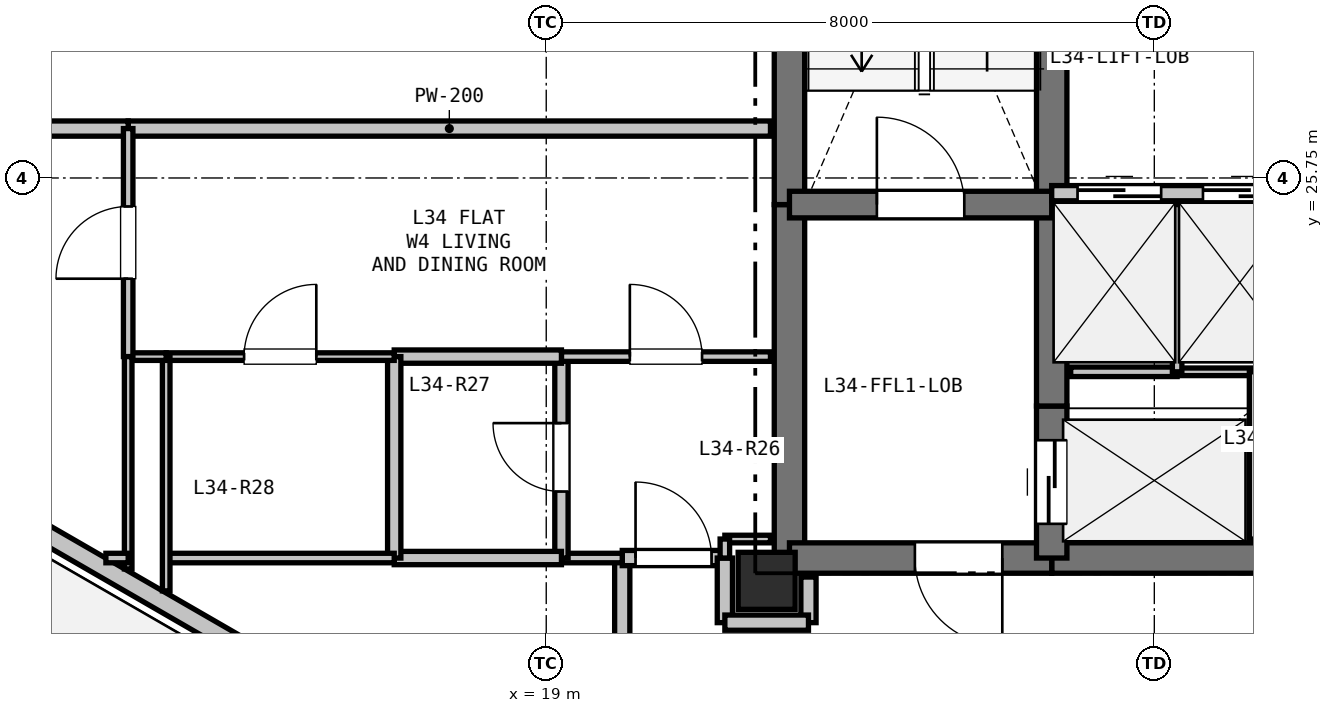
"""IFC4 building model, lengths in metres.
Left out: names, types, materials, properties, quantities, classifications, styles, units other than length and angle.
Written with IfcOpenShell. Run it as: python <this file> out.ifc"""

import sys

from ifc_helpers import new_model, si_unit, direction, frame, frame_2d, origin, origin_2d, place, context, subcontext, project, spatial, rectangle, extrude, element, fill, save


model = new_model("IFC4")
c1 = context("Model", 3, precision=1e-05, world=origin(), true_north=direction((0.0, 1.0)))
c2 = subcontext(c1, "Body", "Model", "MODEL_VIEW")
j1 = project(units=[si_unit("LENGTHUNIT", "METRE"), si_unit("PLANEANGLEUNIT", "RADIAN")], contexts=[c1])
p1 = place(None, origin())
s1 = spatial("IfcSite", under=j1, at=p1, CompositionType="ELEMENT")
p2 = place(p1, origin())
s2 = spatial("IfcBuilding", under=s1, at=p2, CompositionType="ELEMENT")
p3 = place(p2, frame((0.0, 0.0, 124.5)))
s3 = spatial("IfcBuildingStorey", under=s2, at=p3, CompositionType="ELEMENT", Elevation=124.5)
p4 = place(p3, frame((21.9, 20.45, 0.0), z_axis=(0.0, 0.0, 1.0), x_axis=(1.0, 0.0, 0.0)))
e1 = element("IfcColumn", 1, at=p4, inside=s3, PredefinedType="COLUMN", context=c2, shape_type="SweptSolid", body=[
    extrude(rectangle(XDim=0.75, YDim=0.75, at=origin_2d()), origin(), (0.0, 0.0, 1.0), 3.3),
])
p5 = place(p3, frame((16.378, 18.773, 0.0), z_axis=(0.0, 0.0, 1.0), x_axis=(-0.866027848477, 0.499995765644, 0.0)))
e2 = element("IfcWall", 2, at=p5, inside=s3, PredefinedType="SOLIDWALL", context=c2, shape_type="SweptSolid", body=[
    extrude(rectangle(XDim=11.186, YDim=0.25, at=frame_2d((5.593, 0.0))), origin(), (0.0, 0.0, 1.0), 2.68),
])
p6 = place(p5, frame((6.757, 0.0, 0.9)))
e3 = element("IfcOpeningElement", 3, at=p6, cuts=e2, PredefinedType="OPENING", context=c2, shape_type="SweptSolid", body=[
    extrude(rectangle(XDim=1.2, YDim=1.4, at=frame_2d((0.6, 0.7))), frame((0.0, 0.135, 0.0), z_axis=(0.0, -1.0, 0.0), x_axis=(1.0, 0.0, 0.0)), (0.0, 0.0, 1.0), 0.27),
])
p7 = place(p3, frame((22.2, 20.75, 0.0), z_axis=(0.0, 0.0, 1.0), x_axis=(0.0, 1.0, 0.0)))
e4 = element("IfcWall", 4, at=p7, inside=s3, PredefinedType="SHEAR", context=c2, shape_type="SweptSolid", body=[
    extrude(rectangle(XDim=4.65, YDim=0.4, at=frame_2d((2.325, 0.0))), origin(), (0.0, 0.0, 1.0), 3.06),
])
p8 = place(p3, frame((22.2, 25.4, 0.0), z_axis=(0.0, 0.0, 1.0), x_axis=(0.0, 1.0, 0.0)))
e5 = element("IfcWall", 5, at=p8, inside=s3, PredefinedType="SHEAR", context=c2, shape_type="SweptSolid", body=[
    extrude(rectangle(XDim=7.35, YDim=0.4, at=frame_2d((3.675, 0.0))), origin(), (0.0, 0.0, 1.0), 3.06),
])
p9 = place(p3, frame((28.35, 20.75, 0.0), z_axis=(0.0, 0.0, 1.0), x_axis=(-1.0, 0.0, 0.0)))
e6 = element("IfcWall", 6, at=p9, inside=s3, PredefinedType="SHEAR", context=c2, shape_type="SweptSolid", body=[
    extrude(rectangle(XDim=2.7, YDim=0.4, at=frame_2d((1.35, 0.0))), origin(), (0.0, 0.0, 1.0), 3.06),
])
p10 = place(p3, frame((25.65, 20.75, 0.0), z_axis=(0.0, 0.0, 1.0), x_axis=(-1.0, 0.0, 0.0)))
e7 = element("IfcWall", 7, at=p10, inside=s3, PredefinedType="SHEAR", context=c2, shape_type="SweptSolid", body=[
    extrude(rectangle(XDim=3.45, YDim=0.4, at=frame_2d((1.725, 0.0))), origin(), (0.0, 0.0, 1.0), 3.06),
])
p11 = place(p10, frame((0.65, 0.0, 0.0)))
e8 = element("IfcOpeningElement", 8, at=p11, cuts=e7, PredefinedType="OPENING", context=c2, shape_type="SweptSolid", body=[
    extrude(rectangle(XDim=1.15, YDim=2.15, at=frame_2d((0.575, 1.075))), frame((0.0, 0.21, 0.0), z_axis=(0.0, -1.0, 0.0), x_axis=(1.0, 0.0, 0.0)), (0.0, 0.0, 1.0), 0.42),
])
p12 = place(p3, frame((25.65, 20.75, 0.0), z_axis=(0.0, 0.0, 1.0), x_axis=(0.0, 1.0, 0.0)))
e9 = element("IfcWall", 9, at=p12, inside=s3, PredefinedType="SHEAR", context=c2, shape_type="SweptSolid", body=[
    extrude(rectangle(XDim=2.0, YDim=0.4, at=frame_2d((1.0, 0.0))), origin(), (0.0, 0.0, 1.0), 3.06),
])
p13 = place(p12, frame((0.45, 0.0, 0.0)))
e10 = element("IfcOpeningElement", 10, at=p13, cuts=e9, PredefinedType="OPENING", context=c2, shape_type="SweptSolid", body=[
    extrude(rectangle(XDim=1.1, YDim=2.15, at=frame_2d((0.55, 1.075))), frame((0.0, 0.21, 0.0), z_axis=(0.0, -1.0, 0.0), x_axis=(1.0, 0.0, 0.0)), (0.0, 0.0, 1.0), 0.42),
])
p14 = place(p3, frame((25.65, 22.75, 0.0), z_axis=(0.0, 0.0, 1.0), x_axis=(0.0, 1.0, 0.0)))
e11 = element("IfcWall", 11, at=p14, inside=s3, PredefinedType="SHEAR", context=c2, shape_type="SweptSolid", body=[
    extrude(rectangle(XDim=2.8, YDim=0.4, at=frame_2d((1.4, 0.0))), origin(), (0.0, 0.0, 1.0), 3.06),
])
p15 = place(p3, frame((25.65, 25.55, 0.0), z_axis=(0.0, 0.0, 1.0), x_axis=(0.0, 1.0, 0.0)))
e12 = element("IfcWall", 12, at=p15, inside=s3, PredefinedType="SHEAR", context=c2, shape_type="SweptSolid", body=[
    extrude(rectangle(XDim=2.4, YDim=0.4, at=frame_2d((1.2, 0.0))), origin(), (0.0, 0.0, 1.0), 3.06),
])
p16 = place(p3, frame((22.2, 25.4, 0.0), z_axis=(0.0, 0.0, 1.0), x_axis=(1.0, 0.0, 0.0)))
e13 = element("IfcWall", 13, at=p16, inside=s3, PredefinedType="SHEAR", context=c2, shape_type="SweptSolid", body=[
    extrude(rectangle(XDim=3.45, YDim=0.35, at=frame_2d((1.725, 0.0))), origin(), (0.0, 0.0, 1.0), 3.06),
])
p17 = place(p16, frame((1.15, 0.0, 0.0)))
e14 = element("IfcOpeningElement", 14, at=p17, cuts=e13, PredefinedType="OPENING", context=c2, shape_type="SweptSolid", body=[
    extrude(rectangle(XDim=1.15, YDim=2.15, at=frame_2d((0.575, 1.075))), frame((0.0, 0.185, 0.0), z_axis=(0.0, -1.0, 0.0), x_axis=(1.0, 0.0, 0.0)), (0.0, 0.0, 1.0), 0.37),
])
p18 = place(p3, frame((25.65, 25.55, 0.0), z_axis=(0.0, 0.0, 1.0), x_axis=(1.0, 0.0, 0.0)))
e15 = element("IfcWall", 15, at=p18, inside=s3, PredefinedType="PARTITIONING", context=c2, shape_type="SweptSolid", body=[
    extrude(rectangle(XDim=4.95, YDim=0.2, at=frame_2d((2.475, 0.0))), origin(), (0.0, 0.0, 1.0), 3.06),
])
p19 = place(p18, frame((0.34, 0.0, 0.0)))
e16 = element("IfcOpeningElement", 16, at=p19, cuts=e15, PredefinedType="OPENING", context=c2, shape_type="SweptSolid", body=[
    extrude(rectangle(XDim=1.1, YDim=2.15, at=frame_2d((0.55, 1.075))), frame((0.0, 0.11, 0.0), z_axis=(0.0, -1.0, 0.0), x_axis=(1.0, 0.0, 0.0)), (0.0, 0.0, 1.0), 0.22),
])
p20 = place(p18, frame((1.99, 0.0, 0.0)))
e17 = element("IfcOpeningElement", 17, at=p20, cuts=e15, PredefinedType="OPENING", context=c2, shape_type="SweptSolid", body=[
    extrude(rectangle(XDim=1.1, YDim=2.15, at=frame_2d((0.55, 1.075))), frame((0.0, 0.11, 0.0), z_axis=(0.0, -1.0, 0.0), x_axis=(1.0, 0.0, 0.0)), (0.0, 0.0, 1.0), 0.22),
])
p21 = place(p18, frame((3.64, 0.0, 0.0)))
e18 = element("IfcOpeningElement", 18, at=p21, cuts=e15, PredefinedType="OPENING", context=c2, shape_type="SweptSolid", body=[
    extrude(rectangle(XDim=1.1, YDim=2.15, at=frame_2d((0.55, 1.075))), frame((0.0, 0.11, 0.0), z_axis=(0.0, -1.0, 0.0), x_axis=(1.0, 0.0, 0.0)), (0.0, 0.0, 1.0), 0.22),
])
p22 = place(p3, frame((25.9, 23.2, 0.0), z_axis=(0.0, 0.0, 1.0), x_axis=(1.0, 0.0, 0.0)))
e19 = element("IfcWall", 19, at=p22, inside=s3, PredefinedType="PARTITIONING", context=c2, shape_type="SweptSolid", body=[
    extrude(rectangle(XDim=1.4, YDim=0.125, at=frame_2d((0.7, 0.0))), origin(), (0.0, 0.0, 1.0), 3.06),
])
p23 = place(p3, frame((27.3, 23.2, 0.0), z_axis=(0.0, 0.0, 1.0), x_axis=(1.0, 0.0, 0.0)))
e20 = element("IfcWall", 20, at=p23, inside=s3, PredefinedType="PARTITIONING", context=c2, shape_type="SweptSolid", body=[
    extrude(rectangle(XDim=1.05, YDim=0.1, at=frame_2d((0.525, 0.0))), origin(), (0.0, 0.0, 1.0), 3.06),
])
p24 = place(p3, frame((28.35, 23.2, 0.0), z_axis=(0.0, 0.0, 1.0), x_axis=(0.0, -1.0, 0.0)))
e21 = element("IfcWall", 21, at=p24, inside=s3, PredefinedType="PARTITIONING", context=c2, shape_type="SweptSolid", body=[
    extrude(rectangle(XDim=2.2, YDim=0.2, at=frame_2d((1.1, 0.0))), origin(), (0.0, 0.0, 1.0), 3.06),
])
p25 = place(p3, frame((27.3, 25.4, 0.0), z_axis=(0.0, 0.0, 1.0), x_axis=(0.0, -1.0, 0.0)))
e22 = element("IfcWall", 22, at=p25, inside=s3, PredefinedType="PARTITIONING", context=c2, shape_type="SweptSolid", body=[
    extrude(rectangle(XDim=2.2, YDim=0.125, at=frame_2d((1.1, 0.0))), origin(), (0.0, 0.0, 1.0), 3.06),
])
p26 = place(p3, frame((22.45, 19.9, 0.0), z_axis=(0.0, 0.0, 1.0), x_axis=(0.0, 1.0, 0.0)))
e23 = element("IfcWall", 23, at=p26, inside=s3, PredefinedType="PARTITIONING", context=c2, shape_type="SweptSolid", body=[
    extrude(rectangle(XDim=0.6, YDim=0.2, at=frame_2d((0.3, 0.0))), origin(), (0.0, 0.0, 1.0), 2.433),
])
p27 = place(p3, frame((20.0, 18.15, 0.0), z_axis=(0.0, 0.0, 1.0), x_axis=(0.0, 1.0, 0.0)))
e24 = element("IfcWall", 24, at=p27, inside=s3, PredefinedType="PARTITIONING", context=c2, shape_type="SweptSolid", body=[
    extrude(rectangle(XDim=2.6, YDim=0.2, at=frame_2d((1.3, 0.0))), origin(), (0.0, 0.0, 1.0), 3.06),
])
p28 = place(p3, frame((20.0, 20.75, 0.0), z_axis=(0.0, 0.0, 1.0), x_axis=(1.0, 0.0, 0.0)))
e25 = element("IfcWall", 25, at=p28, inside=s3, PredefinedType="PARTITIONING", context=c2, shape_type="SweptSolid", body=[
    extrude(rectangle(XDim=1.35, YDim=0.2, at=frame_2d((0.675, 0.0))), origin(), (0.0, 0.0, 1.0), 2.433),
])
p29 = place(p28, frame((0.175, 0.0, 0.0)))
e26 = element("IfcOpeningElement", 26, at=p29, cuts=e25, PredefinedType="OPENING", context=c2, shape_type="SweptSolid", body=[
    extrude(rectangle(XDim=1.0, YDim=2.15, at=frame_2d((0.5, 1.075))), frame((0.0, 0.11, 0.0), z_axis=(0.0, -1.0, 0.0), x_axis=(1.0, 0.0, 0.0)), (0.0, 0.0, 1.0), 0.22),
])
p30 = place(p3, frame((21.35, 20.75, 0.0), z_axis=(0.0, 0.0, 1.0), x_axis=(0.0, -1.0, 0.0)))
e27 = element("IfcWall", 27, at=p30, inside=s3, PredefinedType="PARTITIONING", context=c2, shape_type="SweptSolid", body=[
    extrude(rectangle(XDim=0.85, YDim=0.2, at=frame_2d((0.425, 0.0))), origin(), (0.0, 0.0, 1.0), 2.433),
])
p31 = place(p3, frame((21.35, 19.9, 0.0), z_axis=(0.0, 0.0, 1.0), x_axis=(1.0, 0.0, 0.0)))
e28 = element("IfcWall", 28, at=p31, inside=s3, PredefinedType="PARTITIONING", context=c2, shape_type="SweptSolid", body=[
    extrude(rectangle(XDim=1.1, YDim=0.2, at=frame_2d((0.55, 0.0))), origin(), (0.0, 0.0, 1.0), 2.433),
])
p32 = place(p3, frame((20.0, 20.75, 0.0), z_axis=(0.0, 0.0, 1.0), x_axis=(-1.0, 0.0, 0.0)))
e29 = element("IfcWall", 29, at=p32, inside=s3, PredefinedType="PARTITIONING", context=c2, shape_type="SweptSolid", body=[
    extrude(rectangle(XDim=0.8, YDim=0.125, at=frame_2d((0.4, 0.0))), origin(), (0.0, 0.0, 1.0), 3.06),
])
p33 = place(p3, frame((19.2, 20.75, 0.0), z_axis=(0.0, 0.0, 1.0), x_axis=(0.0, 1.0, 0.0)))
e30 = element("IfcWall", 30, at=p33, inside=s3, PredefinedType="PLUMBINGWALL", context=c2, shape_type="SweptSolid", body=[
    extrude(rectangle(XDim=2.65, YDim=0.175, at=frame_2d((1.325, 0.0))), origin(), (0.0, 0.0, 1.0), 2.433),
])
p34 = place(p33, frame((0.875, 0.0, 0.0)))
e31 = element("IfcOpeningElement", 31, at=p34, cuts=e30, PredefinedType="OPENING", context=c2, shape_type="SweptSolid", body=[
    extrude(rectangle(XDim=0.9, YDim=2.1, at=frame_2d((0.45, 1.05))), frame((0.0, 0.097, 0.0), z_axis=(0.0, -1.0, 0.0), x_axis=(1.0, 0.0, 0.0)), (0.0, 0.0, 1.0), 0.195),
])
p35 = place(p3, frame((19.2, 23.4, 0.0), z_axis=(0.0, 0.0, 1.0), x_axis=(1.0, 0.0, 0.0)))
e32 = element("IfcWall", 32, at=p35, inside=s3, PredefinedType="PARTITIONING", context=c2, shape_type="SweptSolid", body=[
    extrude(rectangle(XDim=2.75, YDim=0.125, at=frame_2d((1.375, 0.0))), origin(), (0.0, 0.0, 1.0), 2.508),
])
p36 = place(p35, frame((0.9, 0.0, 0.0)))
e33 = element("IfcOpeningElement", 33, at=p36, cuts=e32, PredefinedType="OPENING", context=c2, shape_type="SweptSolid", body=[
    extrude(rectangle(XDim=0.95, YDim=2.1, at=frame_2d((0.475, 1.05))), frame((0.0, 0.073, 0.0), z_axis=(0.0, -1.0, 0.0), x_axis=(1.0, 0.0, 0.0)), (0.0, 0.0, 1.0), 0.145),
])
p37 = place(p3, frame((21.95, 21.0, 0.0), z_axis=(0.0, 0.0, 1.0), x_axis=(-1.0, 0.0, 0.0)))
e34 = element("IfcWall", 34, at=p37, inside=s3, PredefinedType="PARTITIONING", context=c2, shape_type="SweptSolid", body=[
    extrude(rectangle(XDim=0.6, YDim=0.1, at=frame_2d((0.3, 0.0))), origin(), (0.0, 0.0, 1.0), 2.508),
])
p38 = place(p3, frame((21.35, 21.0, 0.0), z_axis=(0.0, 0.0, 1.0), x_axis=(0.0, -1.0, 0.0)))
e35 = element("IfcWall", 35, at=p38, inside=s3, PredefinedType="PARTITIONING", context=c2, shape_type="SweptSolid", body=[
    extrude(rectangle(XDim=0.25, YDim=0.125, at=frame_2d((0.125, 0.0))), origin(), (0.0, 0.0, 1.0), 3.06),
])
for number, where, z_axis, x_axis in (
    (36, (17.0, 23.4, 0.0), (0.0, 0.0, 1.0), (1.0, 0.0, 0.0)),
    (37, (19.2, 20.75, 0.0), (0.0, 0.0, 1.0), (-1.0, 0.0, 0.0)),
):
    element("IfcWall", number, at=place(p3, frame(where, z_axis=z_axis, x_axis=x_axis)), inside=s3, PredefinedType="PLUMBINGWALL", context=c2, shape_type="SweptSolid", body=[
        extrude(rectangle(XDim=2.2, YDim=0.175, at=frame_2d((1.1, 0.0))), origin(), (0.0, 0.0, 1.0), 3.06),
    ])
p39 = place(p3, frame((17.0, 20.75, 0.0), z_axis=(0.0, 0.0, 1.0), x_axis=(0.0, 1.0, 0.0)))
e38 = element("IfcWall", 38, at=p39, inside=s3, PredefinedType="PLUMBINGWALL", context=c2, shape_type="SweptSolid", body=[
    extrude(rectangle(XDim=2.65, YDim=0.175, at=frame_2d((1.325, 0.0))), origin(), (0.0, 0.0, 1.0), 2.433),
])
p40 = place(p3, frame((14.0, 23.4, 0.0), z_axis=(0.0, 0.0, 1.0), x_axis=(1.0, 0.0, 0.0)))
e39 = element("IfcWall", 39, at=p40, inside=s3, PredefinedType="PARTITIONING", context=c2, shape_type="SweptSolid", body=[
    extrude(rectangle(XDim=3.0, YDim=0.1, at=frame_2d((1.5, 0.0))), origin(), (0.0, 0.0, 1.0), 3.06),
])
p41 = place(p40, frame((1.025, 0.0, 0.0)))
e40 = element("IfcOpeningElement", 40, at=p41, cuts=e39, PredefinedType="OPENING", context=c2, shape_type="SweptSolid", body=[
    extrude(rectangle(XDim=0.95, YDim=2.1, at=frame_2d((0.475, 1.05))), frame((0.0, 0.06, 0.0), z_axis=(0.0, -1.0, 0.0), x_axis=(1.0, 0.0, 0.0)), (0.0, 0.0, 1.0), 0.12),
])
p42 = place(p3, frame((17.0, 20.75, 0.0), z_axis=(0.0, 0.0, 1.0), x_axis=(-1.0, 0.0, 0.0)))
e41 = element("IfcWall", 41, at=p42, inside=s3, PredefinedType="PARTITIONING", context=c2, shape_type="SweptSolid", body=[
    extrude(rectangle(XDim=3.0, YDim=0.125, at=frame_2d((1.5, 0.0))), origin(), (0.0, 0.0, 1.0), 2.365),
])
p43 = place(p3, frame((14.0, 20.318, 0.0), z_axis=(0.0, 0.0, 1.0), x_axis=(0.0, 1.0, 0.0)))
e42 = element("IfcWall", 42, at=p43, inside=s3, PredefinedType="PARTITIONING", context=c2, shape_type="SweptSolid", body=[
    extrude(rectangle(XDim=3.082, YDim=0.1, at=frame_2d((1.541, 0.0))), origin(), (0.0, 0.0, 1.0), 2.365),
])
p44 = place(p3, frame((21.95, 26.4, 0.0), z_axis=(0.0, 0.0, 1.0), x_axis=(-1.0, 0.0, 0.0)))
e43 = element("IfcWall", 43, at=p44, inside=s3, PredefinedType="PARTITIONING", context=c2, shape_type="SweptSolid", body=[
    extrude(rectangle(XDim=8.45, YDim=0.2, at=frame_2d((4.225, 0.0))), origin(), (0.0, 0.0, 1.0), 2.508),
])
p45 = place(p3, frame((13.5, 26.4, 0.0), z_axis=(0.0, 0.0, 1.0), x_axis=(-1.0, 0.0, 0.0)))
e44 = element("IfcWall", 44, at=p45, inside=s3, PredefinedType="PARTITIONING", context=c2, shape_type="SweptSolid", body=[
    extrude(rectangle(XDim=6.791, YDim=0.2, at=frame_2d((3.396, 0.0))), origin(), (0.0, 0.0, 1.0), 2.725),
])
p46 = place(p3, frame((14.0, 23.4, 0.0), z_axis=(0.0, 0.0, 1.0), x_axis=(-1.0, 0.0, 0.0)))
e45 = element("IfcWall", 45, at=p46, inside=s3, PredefinedType="PARTITIONING", context=c2, shape_type="SweptSolid", body=[
    extrude(rectangle(XDim=0.5, YDim=0.1, at=frame_2d((0.25, 0.0))), origin(), (0.0, 0.0, 1.0), 3.06),
])
p47 = place(p3, frame((13.5, 23.4, 0.0), z_axis=(0.0, 0.0, 1.0), x_axis=(0.0, 1.0, 0.0)))
e46 = element("IfcWall", 46, at=p47, inside=s3, PredefinedType="PARTITIONING", context=c2, shape_type="SweptSolid", body=[
    extrude(rectangle(XDim=3.0, YDim=0.125, at=frame_2d((1.5, 0.0))), origin(), (0.0, 0.0, 1.0), 3.06),
])
p48 = place(p47, frame((1.025, 0.0, 0.0)))
e47 = element("IfcOpeningElement", 47, at=p48, cuts=e46, PredefinedType="OPENING", context=c2, shape_type="SweptSolid", body=[
    extrude(rectangle(XDim=0.95, YDim=2.1, at=frame_2d((0.475, 1.05))), frame((0.0, 0.073, 0.0), z_axis=(0.0, -1.0, 0.0), x_axis=(1.0, 0.0, 0.0)), (0.0, 0.0, 1.0), 0.145),
])
p49 = place(p3, frame((13.5, 23.4, 0.0), z_axis=(0.0, 0.0, 1.0), x_axis=(0.0, -1.0, 0.0)))
e48 = element("IfcWall", 48, at=p49, inside=s3, PredefinedType="PARTITIONING", context=c2, shape_type="SweptSolid", body=[
    extrude(rectangle(XDim=2.793, YDim=0.1, at=frame_2d((1.396, 0.0))), origin(), (0.0, 0.0, 1.0), 2.365),
])
p50 = place(p3, frame((13.5, 20.75, 0.0), z_axis=(0.0, 0.0, 1.0), x_axis=(-1.0, 0.0, 0.0)))
e49 = element("IfcWall", 49, at=p50, inside=s3, PredefinedType="PARTITIONING", context=c2, shape_type="SweptSolid", body=[
    extrude(rectangle(XDim=0.293, YDim=0.125, at=frame_2d((0.146, 0.0))), origin(), (0.0, 0.0, 1.0), 3.06),
])
p51 = place(p19, origin())
e50 = element("IfcDoor", 50, at=p51, inside=s3, OperationType="SLIDING_TO_LEFT", PredefinedType="DOOR", context=c2, shape_type="SweptSolid", body=[
    extrude(rectangle(XDim=1.1, YDim=2.15, at=frame_2d((0.55, 1.075))), frame((0.0, 0.025, 0.0), z_axis=(0.0, -1.0, 0.0), x_axis=(1.0, 0.0, 0.0)), (0.0, 0.0, 1.0), 0.05),
])
fill(e16, e50)
p52 = place(p20, origin())
e51 = element("IfcDoor", 51, at=p52, inside=s3, OperationType="SLIDING_TO_LEFT", PredefinedType="DOOR", context=c2, shape_type="SweptSolid", body=[
    extrude(rectangle(XDim=1.1, YDim=2.15, at=frame_2d((0.55, 1.075))), frame((0.0, 0.025, 0.0), z_axis=(0.0, -1.0, 0.0), x_axis=(1.0, 0.0, 0.0)), (0.0, 0.0, 1.0), 0.05),
])
fill(e17, e51)
p53 = place(p13, origin())
e52 = element("IfcDoor", 52, at=p53, inside=s3, OperationType="SLIDING_TO_LEFT", PredefinedType="DOOR", context=c2, shape_type="SweptSolid", body=[
    extrude(rectangle(XDim=1.1, YDim=2.15, at=frame_2d((0.55, 1.075))), frame((0.0, 0.025, 0.0), z_axis=(0.0, -1.0, 0.0), x_axis=(1.0, 0.0, 0.0)), (0.0, 0.0, 1.0), 0.05),
])
fill(e10, e52)
p54 = place(p17, origin())
e53 = element("IfcDoor", 53, at=p54, inside=s3, OperationType="SINGLE_SWING_LEFT", PredefinedType="DOOR", context=c2, shape_type="SweptSolid", body=[
    extrude(rectangle(XDim=1.15, YDim=2.15, at=frame_2d((0.575, 1.075))), frame((0.0, 0.025, 0.0), z_axis=(0.0, -1.0, 0.0), x_axis=(1.0, 0.0, 0.0)), (0.0, 0.0, 1.0), 0.05),
])
fill(e14, e53)
p55 = place(p11, origin())
e54 = element("IfcDoor", 54, at=p55, inside=s3, OperationType="SINGLE_SWING_LEFT", PredefinedType="DOOR", context=c2, shape_type="SweptSolid", body=[
    extrude(rectangle(XDim=1.15, YDim=2.15, at=frame_2d((0.575, 1.075))), frame((0.0, 0.025, 0.0), z_axis=(0.0, -1.0, 0.0), x_axis=(1.0, 0.0, 0.0)), (0.0, 0.0, 1.0), 0.05),
])
fill(e8, e54)
p56 = place(p29, origin())
e55 = element("IfcDoor", 55, at=p56, inside=s3, OperationType="SINGLE_SWING_LEFT", PredefinedType="DOOR", context=c2, shape_type="SweptSolid", body=[
    extrude(rectangle(XDim=1.0, YDim=2.15, at=frame_2d((0.5, 1.075))), frame((0.0, 0.025, 0.0), z_axis=(0.0, -1.0, 0.0), x_axis=(1.0, 0.0, 0.0)), (0.0, 0.0, 1.0), 0.05),
])
fill(e26, e55)
p57 = place(p34, origin())
e56 = element("IfcDoor", 56, at=p57, inside=s3, OperationType="SINGLE_SWING_RIGHT", PredefinedType="DOOR", context=c2, shape_type="SweptSolid", body=[
    extrude(rectangle(XDim=0.9, YDim=2.1, at=frame_2d((0.45, 1.05))), frame((0.0, 0.025, 0.0), z_axis=(0.0, -1.0, 0.0), x_axis=(1.0, 0.0, 0.0)), (0.0, 0.0, 1.0), 0.05),
])
fill(e31, e56)
p58 = place(p36, origin())
e57 = element("IfcDoor", 57, at=p58, inside=s3, OperationType="SINGLE_SWING_LEFT", PredefinedType="DOOR", context=c2, shape_type="SweptSolid", body=[
    extrude(rectangle(XDim=0.95, YDim=2.1, at=frame_2d((0.475, 1.05))), frame((0.0, 0.025, 0.0), z_axis=(0.0, -1.0, 0.0), x_axis=(1.0, 0.0, 0.0)), (0.0, 0.0, 1.0), 0.05),
])
fill(e33, e57)
p59 = place(p41, origin())
e58 = element("IfcDoor", 58, at=p59, inside=s3, OperationType="SINGLE_SWING_RIGHT", PredefinedType="DOOR", context=c2, shape_type="SweptSolid", body=[
    extrude(rectangle(XDim=0.95, YDim=2.1, at=frame_2d((0.475, 1.05))), frame((0.0, 0.025, 0.0), z_axis=(0.0, -1.0, 0.0), x_axis=(1.0, 0.0, 0.0)), (0.0, 0.0, 1.0), 0.05),
])
fill(e40, e58)
p60 = place(p48, origin())
e59 = element("IfcDoor", 59, at=p60, inside=s3, OperationType="SINGLE_SWING_LEFT", PredefinedType="DOOR", context=c2, shape_type="SweptSolid", body=[
    extrude(rectangle(XDim=0.95, YDim=2.1, at=frame_2d((0.475, 1.05))), frame((0.0, 0.025, 0.0), z_axis=(0.0, -1.0, 0.0), x_axis=(1.0, 0.0, 0.0)), (0.0, 0.0, 1.0), 0.05),
])
fill(e47, e59)
save(model, sys.argv[1])
